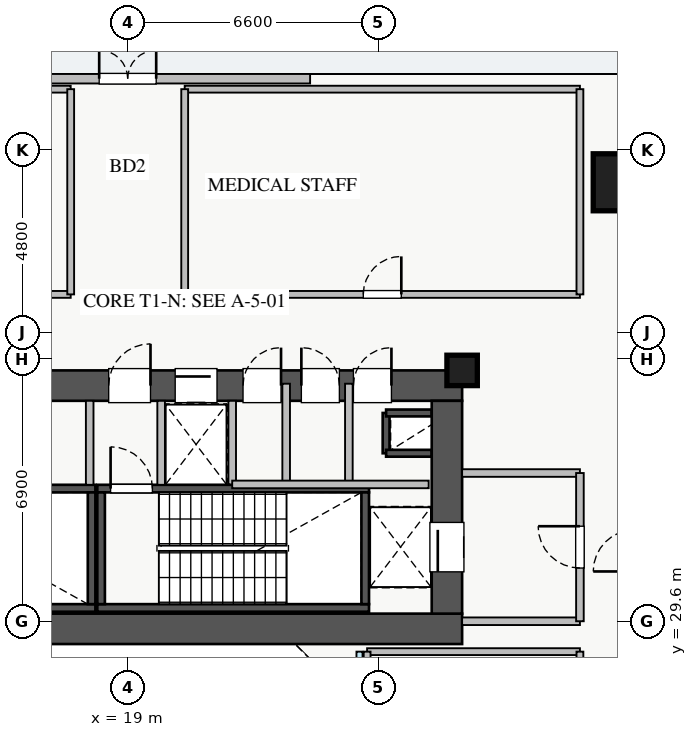
"""IFC4 building model, lengths in metres.
Left out: names, types, materials, properties, quantities, classifications, styles, units other than length and angle.
Written with IfcOpenShell. Run it as: python <this file> out.ifc"""

import sys

from ifc_helpers import new_model, si_unit, direction, frame, frame_2d, origin, origin_2d, place, context, subcontext, project, spatial, rectangle, extrude, source, transform, mapped, element, fill, save


model = new_model("IFC4")
c1 = context("Model", 3, precision=1e-05, world=origin(), true_north=direction((0.0, 1.0)))
c2 = subcontext(c1, "Body", "Model", "MODEL_VIEW")
j1 = project(units=[si_unit("LENGTHUNIT", "METRE"), si_unit("PLANEANGLEUNIT", "RADIAN")], contexts=[c1])
p1 = place(None, origin())
s1 = spatial("IfcSite", under=j1, at=p1, CompositionType="ELEMENT")
p2 = place(p1, origin())
s2 = spatial("IfcBuilding", under=s1, at=p2, CompositionType="ELEMENT")
p3 = place(p2, frame((0.0, 0.0, 5.0)))
s3 = spatial("IfcBuildingStorey", under=s2, at=p3, CompositionType="ELEMENT", Elevation=5.0)
p4 = place(p3, frame((25.8, 34.02, 0.0), z_axis=(0.0, 0.0, 1.0), x_axis=(0.0, 1.0, 0.0)))
e1 = element("IfcWall", 1, at=p4, inside=s3, PredefinedType="SHEAR", context=c2, shape_type="SweptSolid", body=[
    extrude(rectangle(XDim=1.06, YDim=0.18, at=frame_2d((0.53, 0.0))), origin(), (0.0, 0.0, 1.0), 4.18),
])
for number, where, z_axis, x_axis in (
    (2, (25.8, 35.08, 0.0), (0.0, 0.0, 1.0), (1.0, 0.0, 0.0)),
    (3, (25.8, 34.02, 0.0), (0.0, 0.0, 1.0), (1.0, 0.0, 0.0)),
):
    element("IfcWall", number, at=place(p3, frame(where, z_axis=z_axis, x_axis=x_axis)), inside=s3, PredefinedType="SHEAR", context=c2, shape_type="SweptSolid", body=[
        extrude(rectangle(XDim=1.2, YDim=0.18, at=frame_2d((0.6, 0.0))), origin(), (0.0, 0.0, 1.0), 4.18),
    ])
p5 = place(p3, frame((19.88, 33.2, 0.0), z_axis=(0.0, 0.0, 1.0), x_axis=(1.0, 0.0, 0.0)))
e4 = element("IfcWall", 4, at=p5, inside=s3, PredefinedType="SHEAR", context=c2, shape_type="SweptSolid", body=[
    extrude(rectangle(XDim=1.87, YDim=0.18, at=frame_2d((0.935, 0.0))), origin(), (0.0, 0.0, 1.0), 4.18),
])
p6 = place(p3, frame((11.0, 29.95, 0.0), z_axis=(0.0, 0.0, 1.0), x_axis=(1.0, 0.0, 0.0)))
e5 = element("IfcWall", 5, at=p6, inside=s3, PredefinedType="SHEAR", context=c2, shape_type="SweptSolid", body=[
    extrude(rectangle(XDim=7.15, YDim=0.2, at=frame_2d((3.575, 0.0))), origin(), (0.0, 0.0, 1.0), 4.4),
])
p7 = place(p3, frame((11.0, 33.09, 0.0), z_axis=(0.0, 0.0, 1.0), x_axis=(1.0, 0.0, 0.0)))
e6 = element("IfcWall", 6, at=p7, inside=s3, PredefinedType="SHEAR", context=c2, shape_type="SweptSolid", body=[
    extrude(rectangle(XDim=7.15, YDim=0.2, at=frame_2d((3.575, 0.0))), origin(), (0.0, 0.0, 1.0), 4.4),
])
p8 = place(p7, frame((0.35, 0.0, 0.0)))
e7 = element("IfcOpeningElement", 7, at=p8, cuts=e6, PredefinedType="OPENING", context=c2, shape_type="SweptSolid", body=[
    extrude(rectangle(XDim=1.1, YDim=2.05, at=frame_2d((0.55, 1.025))), frame((0.0, 0.11, 0.0), z_axis=(0.0, -1.0, 0.0), x_axis=(1.0, 0.0, 0.0)), (0.0, 0.0, 1.0), 0.22),
])
p9 = place(p3, frame((18.05, 30.05, 0.0), z_axis=(0.0, 0.0, 1.0), x_axis=(0.0, 1.0, 0.0)))
e8 = element("IfcWall", 8, at=p9, inside=s3, PredefinedType="SHEAR", context=c2, shape_type="SweptSolid", body=[
    extrude(rectangle(XDim=2.94, YDim=0.2, at=frame_2d((1.47, 0.0))), origin(), (0.0, 0.0, 1.0), 4.4),
])
p10 = place(p3, frame((18.2, 29.95, 0.0), z_axis=(0.0, 0.0, 1.0), x_axis=(1.0, 0.0, 0.0)))
e9 = element("IfcWall", 9, at=p10, inside=s3, PredefinedType="SHEAR", context=c2, shape_type="SweptSolid", body=[
    extrude(rectangle(XDim=7.15, YDim=0.2, at=frame_2d((3.575, 0.0))), origin(), (0.0, 0.0, 1.0), 4.4),
])
p11 = place(p3, frame((18.2, 33.09, 0.0), z_axis=(0.0, 0.0, 1.0), x_axis=(1.0, 0.0, 0.0)))
e10 = element("IfcWall", 10, at=p11, inside=s3, PredefinedType="SHEAR", context=c2, shape_type="SweptSolid", body=[
    extrude(rectangle(XDim=7.15, YDim=0.2, at=frame_2d((3.575, 0.0))), origin(), (0.0, 0.0, 1.0), 4.4),
])
p12 = place(p11, frame((0.35, 0.0, 0.0)))
e11 = element("IfcOpeningElement", 11, at=p12, cuts=e10, PredefinedType="OPENING", context=c2, shape_type="SweptSolid", body=[
    extrude(rectangle(XDim=1.1, YDim=2.05, at=frame_2d((0.55, 1.025))), frame((0.0, 0.11, 0.0), z_axis=(0.0, -1.0, 0.0), x_axis=(1.0, 0.0, 0.0)), (0.0, 0.0, 1.0), 0.22),
])
for number, where, z_axis, x_axis in (
    (12, (18.3, 30.05, 0.0), (0.0, 0.0, 1.0), (0.0, 1.0, 0.0)),
    (13, (25.25, 30.05, 0.0), (0.0, 0.0, 1.0), (0.0, 1.0, 0.0)),
):
    element("IfcWall", number, at=place(p3, frame(where, z_axis=z_axis, x_axis=x_axis)), inside=s3, PredefinedType="SHEAR", context=c2, shape_type="SweptSolid", body=[
        extrude(rectangle(XDim=2.94, YDim=0.2, at=frame_2d((1.47, 0.0))), origin(), (0.0, 0.0, 1.0), 4.4),
    ])
p13 = place(p3, frame((10.2, 29.4, 0.0), z_axis=(0.0, 0.0, 1.0), x_axis=(1.0, 0.0, 0.0)))
e14 = element("IfcWall", 14, at=p13, inside=s3, PredefinedType="SHEAR", context=c2, shape_type="SweptSolid", body=[
    extrude(rectangle(XDim=17.6, YDim=0.8, at=frame_2d((8.8, 0.0))), origin(), (0.0, 0.0, 1.0), 4.4),
])
p14 = place(p3, frame((10.2, 35.8, 0.0), z_axis=(0.0, 0.0, 1.0), x_axis=(1.0, 0.0, 0.0)))
e15 = element("IfcWall", 15, at=p14, inside=s3, PredefinedType="SHEAR", context=c2, shape_type="SweptSolid", body=[
    extrude(rectangle(XDim=17.6, YDim=0.8, at=frame_2d((8.8, 0.0))), origin(), (0.0, 0.0, 1.0), 4.4),
])
p15 = place(p14, frame((1.15, 0.0, 0.0)))
e16 = element("IfcOpeningElement", 16, at=p15, cuts=e15, PredefinedType="OPENING", context=c2, shape_type="SweptSolid", body=[
    extrude(rectangle(XDim=1.1, YDim=2.05, at=frame_2d((0.55, 1.025))), frame((0.0, 0.41, 0.0), z_axis=(0.0, -1.0, 0.0), x_axis=(1.0, 0.0, 0.0)), (0.0, 0.0, 1.0), 0.82),
])
p16 = place(p14, frame((8.3, 0.0, 0.0)))
e17 = element("IfcOpeningElement", 17, at=p16, cuts=e15, PredefinedType="OPENING", context=c2, shape_type="SweptSolid", body=[
    extrude(rectangle(XDim=1.1, YDim=2.05, at=frame_2d((0.55, 1.025))), frame((0.0, 0.41, 0.0), z_axis=(0.0, -1.0, 0.0), x_axis=(1.0, 0.0, 0.0)), (0.0, 0.0, 1.0), 0.82),
])
p17 = place(p14, frame((10.05, 0.0, 0.0)))
e18 = element("IfcOpeningElement", 18, at=p17, cuts=e15, PredefinedType="OPENING", context=c2, shape_type="SweptSolid", body=[
    extrude(rectangle(XDim=1.1, YDim=2.05, at=frame_2d((0.55, 1.025))), frame((0.0, 0.41, 0.0), z_axis=(0.0, -1.0, 0.0), x_axis=(1.0, 0.0, 0.0)), (0.0, 0.0, 1.0), 0.82),
])
p18 = place(p14, frame((14.74, 0.0, 0.0)))
e19 = element("IfcOpeningElement", 19, at=p18, cuts=e15, PredefinedType="OPENING", context=c2, shape_type="SweptSolid", body=[
    extrude(rectangle(XDim=1.0, YDim=2.05, at=frame_2d((0.5, 1.025))), frame((0.0, 0.41, 0.0), z_axis=(0.0, -1.0, 0.0), x_axis=(1.0, 0.0, 0.0)), (0.0, 0.0, 1.0), 0.82),
])
p19 = place(p14, frame((11.835, 0.0, 0.0)))
e20 = element("IfcOpeningElement", 20, at=p19, cuts=e15, PredefinedType="OPENING", context=c2, shape_type="SweptSolid", body=[
    extrude(rectangle(XDim=1.0, YDim=2.05, at=frame_2d((0.5, 1.025))), frame((0.0, 0.41, 0.0), z_axis=(0.0, -1.0, 0.0), x_axis=(1.0, 0.0, 0.0)), (0.0, 0.0, 1.0), 0.82),
])
p20 = place(p14, frame((13.37, 0.0, 0.0)))
e21 = element("IfcOpeningElement", 21, at=p20, cuts=e15, PredefinedType="OPENING", context=c2, shape_type="SweptSolid", body=[
    extrude(rectangle(XDim=1.0, YDim=2.05, at=frame_2d((0.5, 1.025))), frame((0.0, 0.41, 0.0), z_axis=(0.0, -1.0, 0.0), x_axis=(1.0, 0.0, 0.0)), (0.0, 0.0, 1.0), 0.82),
])
p21 = place(p3, frame((27.4, 29.8, 0.0), z_axis=(0.0, 0.0, 1.0), x_axis=(0.0, 1.0, 0.0)))
e22 = element("IfcWall", 22, at=p21, inside=s3, PredefinedType="SHEAR", context=c2, shape_type="SweptSolid", body=[
    extrude(rectangle(XDim=5.6, YDim=0.8, at=frame_2d((2.8, 0.0))), origin(), (0.0, 0.0, 1.0), 4.4),
])
p22 = place(p21, frame((1.1, 0.0, 0.0)))
e23 = element("IfcOpeningElement", 23, at=p22, cuts=e22, PredefinedType="OPENING", context=c2, shape_type="SweptSolid", body=[
    extrude(rectangle(XDim=1.3, YDim=2.05, at=frame_2d((0.65, 1.025))), frame((0.0, 0.41, 0.0), z_axis=(0.0, -1.0, 0.0), x_axis=(1.0, 0.0, 0.0)), (0.0, 0.0, 1.0), 0.82),
])
m1 = source(origin(), c2, "Body", "SweptSolid", [
    extrude(rectangle(XDim=1.5, YDim=1.5, at=origin_2d()), origin(), (0.0, 0.0, 1.0), 4.4),
])
p23 = place(p3, frame((32.0, 41.15, 0.0), z_axis=(0.0, 0.0, 1.0), x_axis=(1.0, 0.0, 0.0)))
e24 = element("IfcColumn", 24, at=p23, inside=s3, PredefinedType="COLUMN", context=c2, shape_type="MappedRepresentation", body=[
    mapped(m1, transform((0.0, 0.0, 0.0), x_axis=(1.0, 0.0, 0.0), y_axis=(0.0, 1.0, 0.0), z_axis=(0.0, 0.0, 1.0), scale=1.0)),
])
m2 = source(origin(), c2, "Body", "SweptSolid", [
    extrude(rectangle(XDim=0.8, YDim=0.8, at=origin_2d()), origin(), (0.0, 0.0, 1.0), 4.4),
])
p24 = place(p3, frame((27.8, 36.2, 0.0), z_axis=(0.0, 0.0, 1.0), x_axis=(1.0, 0.0, 0.0)))
e25 = element("IfcColumn", 25, at=p24, inside=s3, PredefinedType="PILASTER", context=c2, shape_type="MappedRepresentation", body=[
    mapped(m2, transform((0.0, 0.0, 0.0), x_axis=(1.0, 0.0, 0.0), y_axis=(0.0, 1.0, 0.0), z_axis=(0.0, 0.0, 1.0), scale=1.0)),
])
p25 = place(p3, frame((14.2, 43.875, 0.0), z_axis=(0.0, 0.0, 1.0), x_axis=(1.0, 0.0, 0.0)))
e26 = element("IfcWall", 26, at=p25, inside=s3, PredefinedType="STANDARD", context=c2, shape_type="SweptSolid", body=[
    extrude(rectangle(XDim=9.6, YDim=0.25, at=frame_2d((4.8, 0.0))), origin(), (0.0, 0.0, 1.0), 3.72),
])
p26 = place(p25, frame((4.05, 0.0, 0.0)))
e27 = element("IfcOpeningElement", 27, at=p26, cuts=e26, PredefinedType="OPENING", context=c2, shape_type="SweptSolid", body=[
    extrude(rectangle(XDim=1.5, YDim=2.15, at=frame_2d((0.75, 1.075))), frame((0.0, 0.135, 0.0), z_axis=(0.0, -1.0, 0.0), x_axis=(1.0, 0.0, 0.0)), (0.0, 0.0, 1.0), 0.27),
])
p27 = place(p3, frame((27.8, 29.6, 0.0), z_axis=(0.0, 0.0, 1.0), x_axis=(1.0, 0.0, 0.0)))
e28 = element("IfcWall", 28, at=p27, inside=s3, PredefinedType="PARTITIONING", context=c2, shape_type="SweptSolid", body=[
    extrude(rectangle(XDim=3.1, YDim=0.2, at=frame_2d((1.55, 0.0))), origin(), (0.0, 0.0, 1.0), 3.475),
])
p28 = place(p3, frame((27.8, 33.5, 0.0), z_axis=(0.0, 0.0, 1.0), x_axis=(1.0, 0.0, 0.0)))
e29 = element("IfcWall", 29, at=p28, inside=s3, PredefinedType="PARTITIONING", context=c2, shape_type="SweptSolid", body=[
    extrude(rectangle(XDim=3.1, YDim=0.2, at=frame_2d((1.55, 0.0))), origin(), (0.0, 0.0, 1.0), 3.325),
])
p29 = place(p3, frame((30.9, 29.6, 0.0), z_axis=(0.0, 0.0, 1.0), x_axis=(0.0, 1.0, 0.0)))
e30 = element("IfcWall", 30, at=p29, inside=s3, PredefinedType="PARTITIONING", context=c2, shape_type="SweptSolid", body=[
    extrude(rectangle(XDim=3.9, YDim=0.2, at=frame_2d((1.95, 0.0))), origin(), (0.0, 0.0, 1.0), 4.18),
])
p30 = place(p29, frame((1.4, 0.0, 0.0)))
e31 = element("IfcOpeningElement", 31, at=p30, cuts=e30, PredefinedType="OPENING", context=c2, shape_type="SweptSolid", body=[
    extrude(rectangle(XDim=1.1, YDim=2.05, at=frame_2d((0.55, 1.025))), frame((0.0, 0.11, 0.0), z_axis=(0.0, -1.0, 0.0), x_axis=(1.0, 0.0, 0.0)), (0.0, 0.0, 1.0), 0.22),
])
for number, where, z_axis, x_axis in (
    (32, (18.0, 33.19, 0.0), (0.0, 0.0, 1.0), (0.0, 1.0, 0.0)),
    (33, (19.88, 33.19, 0.0), (0.0, 0.0, 1.0), (0.0, 1.0, 0.0)),
):
    element("IfcWall", number, at=place(p3, frame(where, z_axis=z_axis, x_axis=x_axis)), inside=s3, PredefinedType="PARTITIONING", context=c2, shape_type="SweptSolid", body=[
        extrude(rectangle(XDim=2.21, YDim=0.2, at=frame_2d((1.105, 0.0))), origin(), (0.0, 0.0, 1.0), 4.18),
    ])
p31 = place(p3, frame((24.82, 33.2, 0.0), z_axis=(0.0, 0.0, 1.0), x_axis=(0.0, 1.0, 0.0)))
e34 = element("IfcWall", 34, at=p31, inside=s3, PredefinedType="PARTITIONING", context=c2, shape_type="SweptSolid", body=[
    extrude(rectangle(XDim=2.65, YDim=0.2, at=frame_2d((1.325, 0.0))), origin(), (0.0, 0.0, 1.0), 4.18),
])
p32 = place(p3, frame((21.75, 33.2, 0.0), z_axis=(0.0, 0.0, 1.0), x_axis=(0.0, 1.0, 0.0)))
e35 = element("IfcWall", 35, at=p32, inside=s3, PredefinedType="PARTITIONING", context=c2, shape_type="SweptSolid", body=[
    extrude(rectangle(XDim=2.2, YDim=0.2, at=frame_2d((1.1, 0.0))), origin(), (0.0, 0.0, 1.0), 4.18),
])
p33 = place(p3, frame((23.17, 33.2, 0.0), z_axis=(0.0, 0.0, 1.0), x_axis=(0.0, 1.0, 0.0)))
e36 = element("IfcWall", 36, at=p33, inside=s3, PredefinedType="PARTITIONING", context=c2, shape_type="SweptSolid", body=[
    extrude(rectangle(XDim=2.65, YDim=0.2, at=frame_2d((1.325, 0.0))), origin(), (0.0, 0.0, 1.0), 4.18),
])
p34 = place(p3, frame((21.75, 33.2, 0.0), z_axis=(0.0, 0.0, 1.0), x_axis=(1.0, 0.0, 0.0)))
e37 = element("IfcWall", 37, at=p34, inside=s3, PredefinedType="PARTITIONING", context=c2, shape_type="SweptSolid", body=[
    extrude(rectangle(XDim=5.17, YDim=0.2, at=frame_2d((2.585, 0.0))), origin(), (0.0, 0.0, 1.0), 4.18),
])
p35 = place(p3, frame((25.3, 28.8, 0.0), z_axis=(0.0, 0.0, 1.0), x_axis=(1.0, 0.0, 0.0)))
e38 = element("IfcWall", 38, at=p35, inside=s3, PredefinedType="PARTITIONING", context=c2, shape_type="SweptSolid", body=[
    extrude(rectangle(XDim=5.6, YDim=0.18, at=frame_2d((2.8, 0.0))), origin(), (0.0, 0.0, 1.0), 4.18),
])
p36 = place(p3, frame((25.3, 17.2, 0.0), z_axis=(0.0, 0.0, 1.0), x_axis=(0.0, 1.0, 0.0)))
e39 = element("IfcWall", 39, at=p36, inside=s3, PredefinedType="PARTITIONING", context=c2, shape_type="SweptSolid", body=[
    extrude(rectangle(XDim=11.6, YDim=0.18, at=frame_2d((5.8, 0.0))), origin(), (0.0, 0.0, 1.0), 4.18),
])
p37 = place(p3, frame((30.9, 17.2, 0.0), z_axis=(0.0, 0.0, 1.0), x_axis=(0.0, 1.0, 0.0)))
e40 = element("IfcWall", 40, at=p37, inside=s3, PredefinedType="PARTITIONING", context=c2, shape_type="SweptSolid", body=[
    extrude(rectangle(XDim=11.6, YDim=0.18, at=frame_2d((5.8, 0.0))), origin(), (0.0, 0.0, 1.0), 4.18),
])
p38 = place(p37, frame((5.3, 0.0, 0.0)))
e41 = element("IfcOpeningElement", 41, at=p38, cuts=e40, PredefinedType="OPENING", context=c2, shape_type="SweptSolid", body=[
    extrude(rectangle(XDim=1.0, YDim=2.05, at=frame_2d((0.5, 1.025))), frame((0.0, 0.1, 0.0), z_axis=(0.0, -1.0, 0.0), x_axis=(1.0, 0.0, 0.0)), (0.0, 0.0, 1.0), 0.2),
])
p39 = place(p3, frame((10.2, 38.2, 0.0), z_axis=(0.0, 0.0, 1.0), x_axis=(1.0, 0.0, 0.0)))
e42 = element("IfcWall", 42, at=p39, inside=s3, PredefinedType="PARTITIONING", context=c2, shape_type="SweptSolid", body=[
    extrude(rectangle(XDim=7.3, YDim=0.18, at=frame_2d((3.65, 0.0))), origin(), (0.0, 0.0, 1.0), 4.18),
])
p40 = place(p39, frame((3.15, 0.0, 0.0)))
e43 = element("IfcOpeningElement", 43, at=p40, cuts=e42, PredefinedType="OPENING", context=c2, shape_type="SweptSolid", body=[
    extrude(rectangle(XDim=1.0, YDim=2.05, at=frame_2d((0.5, 1.025))), frame((0.0, 0.1, 0.0), z_axis=(0.0, -1.0, 0.0), x_axis=(1.0, 0.0, 0.0)), (0.0, 0.0, 1.0), 0.2),
])
p41 = place(p3, frame((10.2, 43.6, 0.0), z_axis=(0.0, 0.0, 1.0), x_axis=(1.0, 0.0, 0.0)))
e44 = element("IfcWall", 44, at=p41, inside=s3, PredefinedType="PARTITIONING", context=c2, shape_type="SweptSolid", body=[
    extrude(rectangle(XDim=7.3, YDim=0.18, at=frame_2d((3.65, 0.0))), origin(), (0.0, 0.0, 1.0), 4.18),
])
p42 = place(p3, frame((17.5, 38.2, 0.0), z_axis=(0.0, 0.0, 1.0), x_axis=(0.0, 1.0, 0.0)))
e45 = element("IfcWall", 45, at=p42, inside=s3, PredefinedType="PARTITIONING", context=c2, shape_type="SweptSolid", body=[
    extrude(rectangle(XDim=5.4, YDim=0.18, at=frame_2d((2.7, 0.0))), origin(), (0.0, 0.0, 1.0), 4.18),
])
p43 = place(p3, frame((20.5, 38.2, 0.0), z_axis=(0.0, 0.0, 1.0), x_axis=(1.0, 0.0, 0.0)))
e46 = element("IfcWall", 46, at=p43, inside=s3, PredefinedType="PARTITIONING", context=c2, shape_type="SweptSolid", body=[
    extrude(rectangle(XDim=10.4, YDim=0.18, at=frame_2d((5.2, 0.0))), origin(), (0.0, 0.0, 1.0), 4.18),
])
p44 = place(p43, frame((4.7, 0.0, 0.0)))
e47 = element("IfcOpeningElement", 47, at=p44, cuts=e46, PredefinedType="OPENING", context=c2, shape_type="SweptSolid", body=[
    extrude(rectangle(XDim=1.0, YDim=2.05, at=frame_2d((0.5, 1.025))), frame((0.0, 0.1, 0.0), z_axis=(0.0, -1.0, 0.0), x_axis=(1.0, 0.0, 0.0)), (0.0, 0.0, 1.0), 0.2),
])
p45 = place(p3, frame((20.5, 43.6, 0.0), z_axis=(0.0, 0.0, 1.0), x_axis=(1.0, 0.0, 0.0)))
e48 = element("IfcWall", 48, at=p45, inside=s3, PredefinedType="PARTITIONING", context=c2, shape_type="SweptSolid", body=[
    extrude(rectangle(XDim=10.4, YDim=0.18, at=frame_2d((5.2, 0.0))), origin(), (0.0, 0.0, 1.0), 4.18),
])
for number, where, z_axis, x_axis in (
    (49, (20.5, 38.2, 0.0), (0.0, 0.0, 1.0), (0.0, 1.0, 0.0)),
    (50, (30.9, 38.2, 0.0), (0.0, 0.0, 1.0), (0.0, 1.0, 0.0)),
):
    element("IfcWall", number, at=place(p3, frame(where, z_axis=z_axis, x_axis=x_axis)), inside=s3, PredefinedType="PARTITIONING", context=c2, shape_type="SweptSolid", body=[
        extrude(rectangle(XDim=5.4, YDim=0.18, at=frame_2d((2.7, 0.0))), origin(), (0.0, 0.0, 1.0), 4.18),
    ])
m3 = source(origin(), c2, "Body", "SweptSolid", [
    extrude(rectangle(XDim=1.5, YDim=2.15, at=frame_2d((0.75, 1.075))), frame((0.0, 0.025, 0.0), z_axis=(0.0, -1.0, 0.0), x_axis=(1.0, 0.0, 0.0)), (0.0, 0.0, 1.0), 0.05),
])
p46 = place(p26, origin())
e51 = element("IfcDoor", 51, at=p46, inside=s3, OperationType="DOUBLE_DOOR_SINGLE_SWING", PredefinedType="DOOR", context=c2, shape_type="MappedRepresentation", body=[
    mapped(m3, transform((0.0, 0.0, 0.0), x_axis=(1.0, 0.0, 0.0), y_axis=(0.0, 1.0, 0.0), z_axis=(0.0, 0.0, 1.0), scale=1.0)),
])
fill(e27, e51)
m4 = source(origin(), c2, "Body", "SweptSolid", [
    extrude(rectangle(XDim=1.3, YDim=2.05, at=frame_2d((0.65, 1.025))), frame((0.0, 0.025, 0.0), z_axis=(0.0, -1.0, 0.0), x_axis=(1.0, 0.0, 0.0)), (0.0, 0.0, 1.0), 0.05),
])
p47 = place(p22, origin())
e52 = element("IfcDoor", 52, at=p47, inside=s3, OperationType="SLIDING_TO_LEFT", PredefinedType="DOOR", context=c2, shape_type="MappedRepresentation", body=[
    mapped(m4, transform((0.0, 0.0, 0.0), x_axis=(1.0, 0.0, 0.0), y_axis=(0.0, 1.0, 0.0), z_axis=(0.0, 0.0, 1.0), scale=1.0)),
])
fill(e23, e52)
m5 = source(origin(), c2, "Body", "SweptSolid", [
    extrude(rectangle(XDim=1.1, YDim=2.05, at=frame_2d((0.55, 1.025))), frame((0.0, 0.025, 0.0), z_axis=(0.0, -1.0, 0.0), x_axis=(1.0, 0.0, 0.0)), (0.0, 0.0, 1.0), 0.05),
])
p48 = place(p16, origin())
e53 = element("IfcDoor", 53, at=p48, inside=s3, OperationType="SINGLE_SWING_RIGHT", PredefinedType="DOOR", context=c2, shape_type="MappedRepresentation", body=[
    mapped(m5, transform((0.0, 0.0, 0.0), x_axis=(1.0, 0.0, 0.0), y_axis=(0.0, 1.0, 0.0), z_axis=(0.0, 0.0, 1.0), scale=1.0)),
])
fill(e17, e53)
p49 = place(p12, origin())
e54 = element("IfcDoor", 54, at=p49, inside=s3, OperationType="SINGLE_SWING_LEFT", PredefinedType="DOOR", context=c2, shape_type="MappedRepresentation", body=[
    mapped(m5, transform((0.0, 0.0, 0.0), x_axis=(1.0, 0.0, 0.0), y_axis=(0.0, 1.0, 0.0), z_axis=(0.0, 0.0, 1.0), scale=1.0)),
])
fill(e11, e54)
p50 = place(p17, origin())
e55 = element("IfcDoor", 55, at=p50, inside=s3, OperationType="SLIDING_TO_LEFT", PredefinedType="DOOR", context=c2, shape_type="MappedRepresentation", body=[
    mapped(m5, transform((0.0, 0.0, 0.0), x_axis=(1.0, 0.0, 0.0), y_axis=(0.0, 1.0, 0.0), z_axis=(0.0, 0.0, 1.0), scale=1.0)),
])
fill(e18, e55)
m6 = source(origin(), c2, "Body", "SweptSolid", [
    extrude(rectangle(XDim=1.0, YDim=2.05, at=frame_2d((0.5, 1.025))), frame((0.0, 0.025, 0.0), z_axis=(0.0, -1.0, 0.0), x_axis=(1.0, 0.0, 0.0)), (0.0, 0.0, 1.0), 0.05),
])
p51 = place(p18, origin())
e56 = element("IfcDoor", 56, at=p51, inside=s3, OperationType="SINGLE_SWING_RIGHT", PredefinedType="DOOR", context=c2, shape_type="MappedRepresentation", body=[
    mapped(m6, transform((0.0, 0.0, 0.0), x_axis=(1.0, 0.0, 0.0), y_axis=(0.0, 1.0, 0.0), z_axis=(0.0, 0.0, 1.0), scale=1.0)),
])
fill(e19, e56)
p52 = place(p19, origin())
e57 = element("IfcDoor", 57, at=p52, inside=s3, OperationType="SINGLE_SWING_RIGHT", PredefinedType="DOOR", context=c2, shape_type="MappedRepresentation", body=[
    mapped(m6, transform((0.0, 0.0, 0.0), x_axis=(1.0, 0.0, 0.0), y_axis=(0.0, 1.0, 0.0), z_axis=(0.0, 0.0, 1.0), scale=1.0)),
])
fill(e20, e57)
p53 = place(p20, origin())
e58 = element("IfcDoor", 58, at=p53, inside=s3, OperationType="SINGLE_SWING_LEFT", PredefinedType="DOOR", context=c2, shape_type="MappedRepresentation", body=[
    mapped(m6, transform((0.0, 0.0, 0.0), x_axis=(1.0, 0.0, 0.0), y_axis=(0.0, 1.0, 0.0), z_axis=(0.0, 0.0, 1.0), scale=1.0)),
])
fill(e21, e58)
p54 = place(p30, origin())
e59 = element("IfcDoor", 59, at=p54, inside=s3, OperationType="SINGLE_SWING_RIGHT", PredefinedType="DOOR", context=c2, shape_type="MappedRepresentation", body=[
    mapped(m5, transform((0.0, 0.0, 0.0), x_axis=(1.0, 0.0, 0.0), y_axis=(0.0, 1.0, 0.0), z_axis=(0.0, 0.0, 1.0), scale=1.0)),
])
fill(e31, e59)
p55 = place(p44, origin())
e60 = element("IfcDoor", 60, at=p55, inside=s3, OperationType="SINGLE_SWING_RIGHT", PredefinedType="DOOR", context=c2, shape_type="MappedRepresentation", body=[
    mapped(m6, transform((0.0, 0.0, 0.0), x_axis=(1.0, 0.0, 0.0), y_axis=(0.0, 1.0, 0.0), z_axis=(0.0, 0.0, 1.0), scale=1.0)),
])
fill(e47, e60)
save(model, sys.argv[1])
